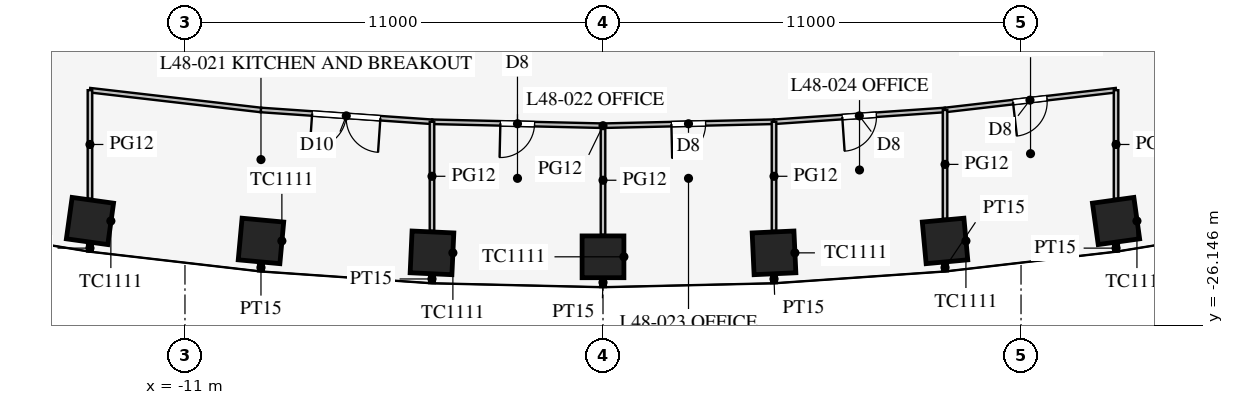
"""IFC4 building model, lengths in metres.
Left out: names, types, materials, properties, quantities, classifications, styles, units other than length and angle.
Written with IfcOpenShell. Run it as: python <this file> out.ifc"""

import sys

from ifc_helpers import new_model, si_unit, direction, frame, frame_2d, origin, origin_2d, place, context, subcontext, project, spatial, rectangle, extrude, element, fill, save


model = new_model("IFC4")
c1 = context("Model", 3, precision=1e-05, world=origin(), true_north=direction((0.0, 1.0)))
c2 = subcontext(c1, "Body", "Model", "MODEL_VIEW")
j1 = project(units=[si_unit("LENGTHUNIT", "METRE"), si_unit("PLANEANGLEUNIT", "RADIAN")], contexts=[c1])
p1 = place(None, origin())
s1 = spatial("IfcSite", under=j1, at=p1, CompositionType="ELEMENT")
p2 = place(p1, origin())
s2 = spatial("IfcBuilding", under=s1, at=p2, CompositionType="ELEMENT")
p3 = place(p2, frame((0.0, 0.0, 210.7)))
s3 = spatial("IfcBuildingStorey", under=s2, at=p3, CompositionType="ELEMENT", Elevation=210.7)
for number, where, z_axis, x_axis in (
    (1, (-13.5, -23.408, 0.0), (0.0, 0.0, 1.0), (0.99, -0.138, 0.0)),
    (2, (-9.0, -23.933, 0.0), (0.0, 0.0, 1.0), (0.996, -0.092, 0.0)),
    (3, (-4.5, -24.246, 0.0), (0.0, 0.0, 1.0), (0.999, -0.046, 0.0)),
    (4, (0.0, -24.351, 0.0), (0.0, 0.0, 1.0), (1.0, 0.0, 0.0)),
    (5, (4.5, -24.246, 0.0), (0.0, 0.0, 1.0), (0.999, 0.046, 0.0)),
    (6, (9.0, -23.933, 0.0), (0.0, 0.0, 1.0), (0.996, 0.092, 0.0)),
    (7, (13.5, -23.408, 0.0), (0.0, 0.0, 1.0), (0.99, 0.138, 0.0)),
):
    element("IfcColumn", number, at=place(p3, frame(where, z_axis=z_axis, x_axis=x_axis)), inside=s3, PredefinedType="COLUMN", context=c2, shape_type="SweptSolid", body=[
        extrude(rectangle(XDim=1.1, YDim=1.1, at=origin_2d()), origin(), (0.0, 0.0, 1.0), 4.2),
    ])
p4 = place(p3, frame((13.5, -24.033, 0.0), z_axis=(0.0, 0.0, 1.0), x_axis=(0.0, -1.0, 0.0)))
e8 = element("IfcWall", 8, at=p4, inside=s3, PredefinedType="PARTITIONING", context=c2, shape_type="SweptSolid", body=[
    extrude(rectangle(XDim=0.178, YDim=0.15, at=frame_2d((0.089, 0.0))), origin(), (0.0, 0.0, 1.0), 2.9),
])
p5 = place(p3, frame((4.5, -24.825, 0.0), z_axis=(0.0, 0.0, 1.0), x_axis=(0.0, -1.0, 0.0)))
e9 = element("IfcWall", 9, at=p5, inside=s3, PredefinedType="PARTITIONING", context=c2, shape_type="SweptSolid", body=[
    extrude(rectangle(XDim=0.217, YDim=0.15, at=frame_2d((0.108, 0.0))), origin(), (0.0, 0.0, 1.0), 2.9),
])
p6 = place(p3, frame((9.0, -24.535, 0.0), z_axis=(0.0, 0.0, 1.0), x_axis=(0.0, -1.0, 0.0)))
e10 = element("IfcWall", 10, at=p6, inside=s3, PredefinedType="PARTITIONING", context=c2, shape_type="SweptSolid", body=[
    extrude(rectangle(XDim=0.196, YDim=0.15, at=frame_2d((0.098, 0.0))), origin(), (0.0, 0.0, 1.0), 2.9),
])
p7 = place(p3, frame((0.0, -24.905, 0.0), z_axis=(0.0, 0.0, 1.0), x_axis=(0.0, -1.0, 0.0)))
e11 = element("IfcWall", 11, at=p7, inside=s3, PredefinedType="PARTITIONING", context=c2, shape_type="SweptSolid", body=[
    extrude(rectangle(XDim=0.241, YDim=0.15, at=frame_2d((0.121, 0.0))), origin(), (0.0, 0.0, 1.0), 2.9),
])
p8 = place(p3, frame((-13.5, -24.033, 0.0), z_axis=(0.0, 0.0, 1.0), x_axis=(0.0, -1.0, 0.0)))
e12 = element("IfcWall", 12, at=p8, inside=s3, PredefinedType="PARTITIONING", context=c2, shape_type="SweptSolid", body=[
    extrude(rectangle(XDim=0.178, YDim=0.15, at=frame_2d((0.089, 0.0))), origin(), (0.0, 0.0, 1.0), 2.9),
])
p9 = place(p3, frame((-4.5, -24.825, 0.0), z_axis=(0.0, 0.0, 1.0), x_axis=(0.0, -1.0, 0.0)))
e13 = element("IfcWall", 13, at=p9, inside=s3, PredefinedType="PARTITIONING", context=c2, shape_type="SweptSolid", body=[
    extrude(rectangle(XDim=0.217, YDim=0.15, at=frame_2d((0.108, 0.0))), origin(), (0.0, 0.0, 1.0), 2.9),
])
p10 = place(p3, frame((-9.0, -24.535, 0.0), z_axis=(0.0, 0.0, 1.0), x_axis=(0.0, -1.0, 0.0)))
e14 = element("IfcWall", 14, at=p10, inside=s3, PredefinedType="PARTITIONING", context=c2, shape_type="SweptSolid", body=[
    extrude(rectangle(XDim=0.196, YDim=0.15, at=frame_2d((0.098, 0.0))), origin(), (0.0, 0.0, 1.0), 2.9),
])
p11 = place(p3, frame((0.0, -20.901, 0.0), z_axis=(0.0, 0.0, 1.0), x_axis=(0.99973552509, 0.022997388381, 0.0)))
e15 = element("IfcWall", 15, at=p11, inside=s3, PredefinedType="PARTITIONING", context=c2, shape_type="SweptSolid", body=[
    extrude(rectangle(XDim=4.501, YDim=0.12, at=frame_2d((2.25, 0.0))), origin(), (0.0, 0.0, 1.0), 2.9),
])
p12 = place(p11, frame((1.8, 0.0, 0.15)))
e16 = element("IfcOpeningElement", 16, at=p12, cuts=e15, PredefinedType="OPENING", context=c2, shape_type="SweptSolid", body=[
    extrude(rectangle(XDim=0.9, YDim=2.1, at=frame_2d((0.45, 1.05))), frame((0.0, 0.07, 0.0), z_axis=(0.0, -1.0, 0.0), x_axis=(1.0, 0.0, 0.0)), (0.0, 0.0, 1.0), 0.14),
])
p13 = place(p3, frame((4.5, -20.797, 0.0), z_axis=(0.0, 0.0, 1.0), x_axis=(0.997623533978, 0.068900540297, 0.0)))
e17 = element("IfcWall", 17, at=p13, inside=s3, PredefinedType="PARTITIONING", context=c2, shape_type="SweptSolid", body=[
    extrude(rectangle(XDim=4.511, YDim=0.12, at=frame_2d((2.255, 0.0))), origin(), (0.0, 0.0, 1.0), 2.9),
])
p14 = place(p13, frame((1.8, 0.0, 0.15)))
e18 = element("IfcOpeningElement", 18, at=p14, cuts=e17, PredefinedType="OPENING", context=c2, shape_type="SweptSolid", body=[
    extrude(rectangle(XDim=0.9, YDim=2.1, at=frame_2d((0.45, 1.05))), frame((0.0, 0.07, 0.0), z_axis=(0.0, -1.0, 0.0), x_axis=(1.0, 0.0, 0.0)), (0.0, 0.0, 1.0), 0.14),
])
p15 = place(p3, frame((9.0, -20.486, 0.0), z_axis=(0.0, 0.0, 1.0), x_axis=(0.993382946625, 0.114849124309, 0.0)))
e19 = element("IfcWall", 19, at=p15, inside=s3, PredefinedType="PARTITIONING", context=c2, shape_type="SweptSolid", body=[
    extrude(rectangle(XDim=4.53, YDim=0.12, at=frame_2d((2.265, 0.0))), origin(), (0.0, 0.0, 1.0), 2.9),
])
p16 = place(p15, frame((1.8, 0.0, 0.15)))
e20 = element("IfcOpeningElement", 20, at=p16, cuts=e19, PredefinedType="OPENING", context=c2, shape_type="SweptSolid", body=[
    extrude(rectangle(XDim=0.9, YDim=2.1, at=frame_2d((0.45, 1.05))), frame((0.0, 0.07, 0.0), z_axis=(0.0, -1.0, 0.0), x_axis=(1.0, 0.0, 0.0)), (0.0, 0.0, 1.0), 0.14),
])
p17 = place(p3, frame((-13.5, -19.966, 0.0), z_axis=(0.0, 0.0, 1.0), x_axis=(0.993382946625, -0.114849124309, 0.0)))
e21 = element("IfcWall", 21, at=p17, inside=s3, PredefinedType="PARTITIONING", context=c2, shape_type="SweptSolid", body=[
    extrude(rectangle(XDim=4.53, YDim=0.12, at=frame_2d((2.265, 0.0))), origin(), (0.0, 0.0, 1.0), 2.9),
])
p18 = place(p3, frame((-4.5, -20.797, 0.0), z_axis=(0.0, 0.0, 1.0), x_axis=(0.99973552509, -0.022997388381, 0.0)))
e22 = element("IfcWall", 22, at=p18, inside=s3, PredefinedType="PARTITIONING", context=c2, shape_type="SweptSolid", body=[
    extrude(rectangle(XDim=4.501, YDim=0.12, at=frame_2d((2.25, 0.0))), origin(), (0.0, 0.0, 1.0), 2.9),
])
p19 = place(p18, frame((1.8, 0.0, 0.15)))
e23 = element("IfcOpeningElement", 23, at=p19, cuts=e22, PredefinedType="OPENING", context=c2, shape_type="SweptSolid", body=[
    extrude(rectangle(XDim=0.9, YDim=2.1, at=frame_2d((0.45, 1.05))), frame((0.0, 0.07, 0.0), z_axis=(0.0, -1.0, 0.0), x_axis=(1.0, 0.0, 0.0)), (0.0, 0.0, 1.0), 0.14),
])
p20 = place(p3, frame((-9.0, -20.486, 0.0), z_axis=(0.0, 0.0, 1.0), x_axis=(0.997623533978, -0.068900540297, 0.0)))
e24 = element("IfcWall", 24, at=p20, inside=s3, PredefinedType="PARTITIONING", context=c2, shape_type="SweptSolid", body=[
    extrude(rectangle(XDim=4.511, YDim=0.12, at=frame_2d((2.255, 0.0))), origin(), (0.0, 0.0, 1.0), 2.9),
])
p21 = place(p20, frame((1.35, 0.0, 0.15)))
e25 = element("IfcOpeningElement", 25, at=p21, cuts=e24, PredefinedType="OPENING", context=c2, shape_type="SweptSolid", body=[
    extrude(rectangle(XDim=1.8, YDim=2.1, at=frame_2d((0.9, 1.05))), frame((0.0, 0.07, 0.0), z_axis=(0.0, -1.0, 0.0), x_axis=(1.0, 0.0, 0.0)), (0.0, 0.0, 1.0), 0.14),
])
p22 = place(p3, frame((0.0, -20.901, 0.0), z_axis=(0.0, 0.0, 1.0), x_axis=(0.0, -1.0, 0.0)))
e26 = element("IfcWall", 26, at=p22, inside=s3, PredefinedType="PARTITIONING", context=c2, shape_type="SweptSolid", body=[
    extrude(rectangle(XDim=2.87, YDim=0.12, at=frame_2d((1.435, 0.0))), origin(), (0.0, 0.0, 1.0), 2.9),
])
p23 = place(p3, frame((13.5, -19.966, 0.0), z_axis=(0.0, 0.0, 1.0), x_axis=(0.0, -1.0, 0.0)))
e27 = element("IfcWall", 27, at=p23, inside=s3, PredefinedType="PARTITIONING", context=c2, shape_type="SweptSolid", body=[
    extrude(rectangle(XDim=2.857, YDim=0.12, at=frame_2d((1.428, 0.0))), origin(), (0.0, 0.0, 1.0), 2.9),
])
p24 = place(p3, frame((4.5, -20.797, 0.0), z_axis=(0.0, 0.0, 1.0), x_axis=(0.0, -1.0, 0.0)))
e28 = element("IfcWall", 28, at=p24, inside=s3, PredefinedType="PARTITIONING", context=c2, shape_type="SweptSolid", body=[
    extrude(rectangle(XDim=2.869, YDim=0.12, at=frame_2d((1.434, 0.0))), origin(), (0.0, 0.0, 1.0), 2.9),
])
p25 = place(p3, frame((9.0, -20.486, 0.0), z_axis=(0.0, 0.0, 1.0), x_axis=(0.0, -1.0, 0.0)))
e29 = element("IfcWall", 29, at=p25, inside=s3, PredefinedType="PARTITIONING", context=c2, shape_type="SweptSolid", body=[
    extrude(rectangle(XDim=2.864, YDim=0.12, at=frame_2d((1.432, 0.0))), origin(), (0.0, 0.0, 1.0), 2.9),
])
p26 = place(p3, frame((-13.5, -19.966, 0.0), z_axis=(0.0, 0.0, 1.0), x_axis=(0.0, -1.0, 0.0)))
e30 = element("IfcWall", 30, at=p26, inside=s3, PredefinedType="PARTITIONING", context=c2, shape_type="SweptSolid", body=[
    extrude(rectangle(XDim=2.857, YDim=0.12, at=frame_2d((1.428, 0.0))), origin(), (0.0, 0.0, 1.0), 2.9),
])
p27 = place(p3, frame((-4.5, -20.797, 0.0), z_axis=(0.0, 0.0, 1.0), x_axis=(0.0, -1.0, 0.0)))
e31 = element("IfcWall", 31, at=p27, inside=s3, PredefinedType="PARTITIONING", context=c2, shape_type="SweptSolid", body=[
    extrude(rectangle(XDim=2.869, YDim=0.12, at=frame_2d((1.434, 0.0))), origin(), (0.0, 0.0, 1.0), 2.9),
])
p28 = place(p21, frame((1.8, 0.0, 0.0), z_axis=(0.0, 0.0, 1.0), x_axis=(-1.0, 0.0, 0.0)))
e32 = element("IfcDoor", 32, at=p28, inside=s3, OperationType="DOUBLE_DOOR_SINGLE_SWING", PredefinedType="DOOR", context=c2, shape_type="SweptSolid", body=[
    extrude(rectangle(XDim=1.8, YDim=2.1, at=frame_2d((0.9, 1.05))), frame((0.0, 0.025, 0.0), z_axis=(0.0, -1.0, 0.0), x_axis=(1.0, 0.0, 0.0)), (0.0, 0.0, 1.0), 0.05),
])
fill(e25, e32)
p29 = place(p19, frame((0.9, 0.0, 0.0), z_axis=(0.0, 0.0, 1.0), x_axis=(-1.0, 0.0, 0.0)))
e33 = element("IfcDoor", 33, at=p29, inside=s3, OperationType="SINGLE_SWING_RIGHT", PredefinedType="DOOR", context=c2, shape_type="SweptSolid", body=[
    extrude(rectangle(XDim=0.9, YDim=2.1, at=frame_2d((0.45, 1.05))), frame((0.0, 0.025, 0.0), z_axis=(0.0, -1.0, 0.0), x_axis=(1.0, 0.0, 0.0)), (0.0, 0.0, 1.0), 0.05),
])
fill(e23, e33)
p30 = place(p12, frame((0.9, 0.0, 0.0), z_axis=(0.0, 0.0, 1.0), x_axis=(-1.0, 0.0, 0.0)))
e34 = element("IfcDoor", 34, at=p30, inside=s3, OperationType="SINGLE_SWING_RIGHT", PredefinedType="DOOR", context=c2, shape_type="SweptSolid", body=[
    extrude(rectangle(XDim=0.9, YDim=2.1, at=frame_2d((0.45, 1.05))), frame((0.0, 0.025, 0.0), z_axis=(0.0, -1.0, 0.0), x_axis=(1.0, 0.0, 0.0)), (0.0, 0.0, 1.0), 0.05),
])
fill(e16, e34)
p31 = place(p14, frame((0.9, 0.0, 0.0), z_axis=(0.0, 0.0, 1.0), x_axis=(-1.0, 0.0, 0.0)))
e35 = element("IfcDoor", 35, at=p31, inside=s3, OperationType="SINGLE_SWING_RIGHT", PredefinedType="DOOR", context=c2, shape_type="SweptSolid", body=[
    extrude(rectangle(XDim=0.9, YDim=2.1, at=frame_2d((0.45, 1.05))), frame((0.0, 0.025, 0.0), z_axis=(0.0, -1.0, 0.0), x_axis=(1.0, 0.0, 0.0)), (0.0, 0.0, 1.0), 0.05),
])
fill(e18, e35)
p32 = place(p16, frame((0.9, 0.0, 0.0), z_axis=(0.0, 0.0, 1.0), x_axis=(-1.0, 0.0, 0.0)))
e36 = element("IfcDoor", 36, at=p32, inside=s3, OperationType="SINGLE_SWING_RIGHT", PredefinedType="DOOR", context=c2, shape_type="SweptSolid", body=[
    extrude(rectangle(XDim=0.9, YDim=2.1, at=frame_2d((0.45, 1.05))), frame((0.0, 0.025, 0.0), z_axis=(0.0, -1.0, 0.0), x_axis=(1.0, 0.0, 0.0)), (0.0, 0.0, 1.0), 0.05),
])
fill(e20, e36)
save(model, sys.argv[1])
